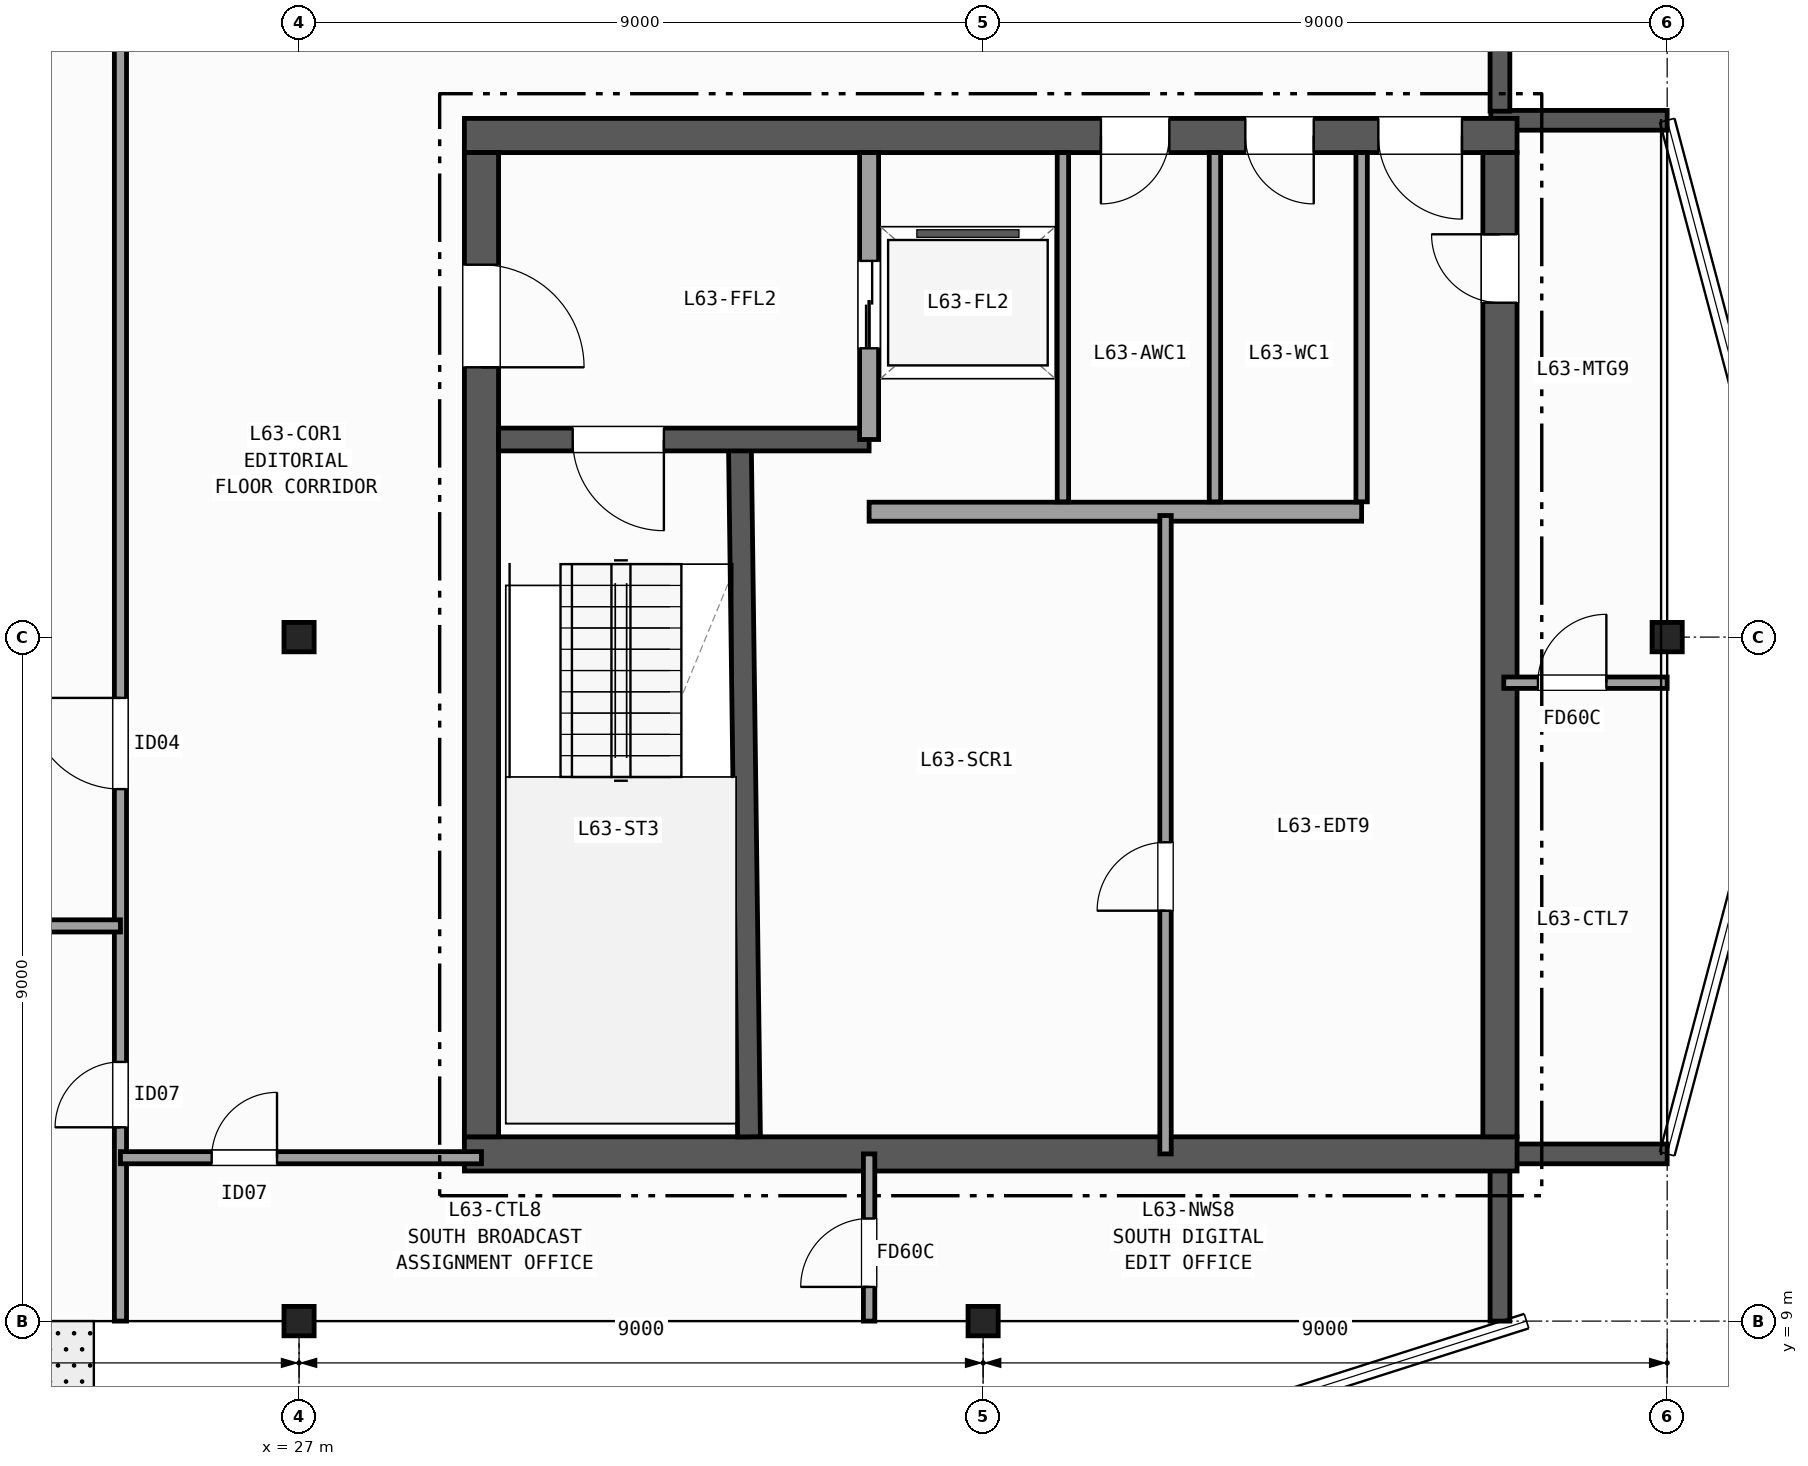
"""IFC4 building model, lengths in metres.
Left out: names, types, materials, properties, quantities, classifications, styles, units other than length and angle.
Written with IfcOpenShell. Run it as: python <this file> out.ifc"""

import sys

from ifc_helpers import new_model, si_unit, direction, frame, frame_2d, origin, origin_2d, place, context, subcontext, project, spatial, rectangle, i_section, extrude, element, fill, save


model = new_model("IFC4")
c1 = context("Model", 3, precision=1e-05, world=origin(), true_north=direction((0.0, 1.0)))
c2 = subcontext(c1, "Body", "Model", "MODEL_VIEW")
j1 = project(units=[si_unit("LENGTHUNIT", "METRE"), si_unit("PLANEANGLEUNIT", "RADIAN")], contexts=[c1])
p1 = place(None, origin())
s1 = spatial("IfcSite", under=j1, at=p1, CompositionType="ELEMENT")
p2 = place(p1, origin())
s2 = spatial("IfcBuilding", under=s1, at=p2, CompositionType="ELEMENT")
p3 = place(p2, frame((0.0, 0.0, 251.9)))
s3 = spatial("IfcBuildingStorey", under=s2, at=p3, CompositionType="ELEMENT", Elevation=251.9)
for number, where, z_axis, x_axis in (
    (1, (27.0, 9.0, 0.0), (0.0, 0.0, 1.0), (1.0, 0.0, 0.0)),
    (2, (27.0, 18.0, 0.0), (0.0, 0.0, 1.0), (1.0, 0.0, 0.0)),
    (3, (36.0, 9.0, 0.0), (0.0, 0.0, 1.0), (1.0, 0.0, 0.0)),
    (4, (45.0, 18.0, 0.0), (0.0, 0.0, 1.0), (1.0, 0.0, 0.0)),
):
    element("IfcColumn", number, at=place(p3, frame(where, z_axis=z_axis, x_axis=x_axis)), inside=s3, PredefinedType="COLUMN", context=c2, shape_type="SweptSolid", body=[
        extrude(i_section(OverallWidth=0.397, OverallDepth=0.387, WebThickness=0.021, FlangeThickness=0.033, FilletRadius=0.015, at=origin_2d()), origin(), (0.0, 0.0, 1.0), 3.7),
    ])
p4 = place(p3, frame((42.8, 9.0, 0.0), z_axis=(0.0, 0.0, 1.0), x_axis=(0.0, 1.0, 0.0)))
e5 = element("IfcWall", 5, at=p4, inside=s3, PredefinedType="SOLIDWALL", context=c2, shape_type="SweptSolid", body=[
    extrude(rectangle(XDim=2.08, YDim=0.26, at=frame_2d((1.04, 0.0))), origin(), (0.0, 0.0, 1.0), 3.42),
])
for number, where, z_axis, x_axis in (
    (6, (42.68, 11.2, 0.0), (0.0, 0.0, 1.0), (1.0, 0.0, 0.0)),
    (7, (45.0, 24.8, 0.0), (0.0, 0.0, 1.0), (-1.0, 0.0, 0.0)),
):
    element("IfcWall", number, at=place(p3, frame(where, z_axis=z_axis, x_axis=x_axis)), inside=s3, PredefinedType="SOLIDWALL", context=c2, shape_type="SweptSolid", body=[
        extrude(rectangle(XDim=2.32, YDim=0.26, at=frame_2d((1.16, 0.0))), origin(), (0.0, 0.0, 1.0), 3.42),
    ])
p5 = place(p3, frame((42.8, 24.92, 0.0), z_axis=(0.0, 0.0, 1.0), x_axis=(0.0, 1.0, 0.0)))
e8 = element("IfcWall", 8, at=p5, inside=s3, PredefinedType="SOLIDWALL", context=c2, shape_type="SweptSolid", body=[
    extrude(rectangle(XDim=2.08, YDim=0.26, at=frame_2d((1.04, 0.0))), origin(), (0.0, 0.0, 1.0), 3.42),
])
p6 = place(p3, frame((29.175, 11.2, 0.0), z_axis=(0.0, 0.0, 1.0), x_axis=(1.0, 0.0, 0.0)))
e9 = element("IfcWall", 9, at=p6, inside=s3, PredefinedType="SHEAR", context=c2, shape_type="SweptSolid", body=[
    extrude(rectangle(XDim=13.85, YDim=0.45, at=frame_2d((6.925, 0.0))), origin(), (0.0, 0.0, 1.0), 3.42),
])
p7 = place(p3, frame((43.025, 24.6, 0.0), z_axis=(0.0, 0.0, 1.0), x_axis=(-1.0, 0.0, 0.0)))
e10 = element("IfcWall", 10, at=p7, inside=s3, PredefinedType="SHEAR", context=c2, shape_type="SweptSolid", body=[
    extrude(rectangle(XDim=13.85, YDim=0.45, at=frame_2d((6.925, 0.0))), origin(), (0.0, 0.0, 1.0), 3.42),
])
p8 = place(p7, frame((0.725, 0.0, 0.0)))
e11 = element("IfcOpeningElement", 11, at=p8, cuts=e10, PredefinedType="OPENING", context=c2, shape_type="SweptSolid", body=[
    extrude(rectangle(XDim=1.1, YDim=2.15, at=frame_2d((0.55, 1.075))), frame((0.0, 0.235, 0.0), z_axis=(0.0, -1.0, 0.0), x_axis=(1.0, 0.0, 0.0)), (0.0, 0.0, 1.0), 0.47),
])
p9 = place(p7, frame((2.675, 0.0, 0.0)))
e12 = element("IfcOpeningElement", 12, at=p9, cuts=e10, PredefinedType="OPENING", context=c2, shape_type="SweptSolid", body=[
    extrude(rectangle(XDim=0.9, YDim=2.1, at=frame_2d((0.45, 1.05))), frame((0.0, 0.235, 0.0), z_axis=(0.0, -1.0, 0.0), x_axis=(1.0, 0.0, 0.0)), (0.0, 0.0, 1.0), 0.47),
])
p10 = place(p7, frame((4.575, 0.0, 0.0)))
e13 = element("IfcOpeningElement", 13, at=p10, cuts=e10, PredefinedType="OPENING", context=c2, shape_type="SweptSolid", body=[
    extrude(rectangle(XDim=0.9, YDim=2.1, at=frame_2d((0.45, 1.05))), frame((0.0, 0.235, 0.0), z_axis=(0.0, -1.0, 0.0), x_axis=(1.0, 0.0, 0.0)), (0.0, 0.0, 1.0), 0.47),
])
p11 = place(p3, frame((29.4, 24.375, 0.0), z_axis=(0.0, 0.0, 1.0), x_axis=(0.0, -1.0, 0.0)))
e14 = element("IfcWall", 14, at=p11, inside=s3, PredefinedType="SHEAR", context=c2, shape_type="SweptSolid", body=[
    extrude(rectangle(XDim=12.95, YDim=0.45, at=frame_2d((6.475, 0.0))), origin(), (0.0, 0.0, 1.0), 3.42),
])
p12 = place(p11, frame((1.475, 0.0, 0.0)))
e15 = element("IfcOpeningElement", 15, at=p12, cuts=e14, PredefinedType="OPENING", context=c2, shape_type="SweptSolid", body=[
    extrude(rectangle(XDim=1.35, YDim=2.15, at=frame_2d((0.675, 1.075))), frame((0.0, 0.235, 0.0), z_axis=(0.0, -1.0, 0.0), x_axis=(1.0, 0.0, 0.0)), (0.0, 0.0, 1.0), 0.47),
])
p13 = place(p3, frame((42.8, 11.425, 0.0), z_axis=(0.0, 0.0, 1.0), x_axis=(0.0, 1.0, 0.0)))
e16 = element("IfcWall", 16, at=p13, inside=s3, PredefinedType="SHEAR", context=c2, shape_type="SweptSolid", body=[
    extrude(rectangle(XDim=12.95, YDim=0.45, at=frame_2d((6.475, 0.0))), origin(), (0.0, 0.0, 1.0), 3.42),
])
p14 = place(p13, frame((10.975, 0.0, 0.0)))
e17 = element("IfcOpeningElement", 17, at=p14, cuts=e16, PredefinedType="OPENING", context=c2, shape_type="SweptSolid", body=[
    extrude(rectangle(XDim=0.9, YDim=2.1, at=frame_2d((0.45, 1.05))), frame((0.0, 0.235, 0.0), z_axis=(0.0, -1.0, 0.0), x_axis=(1.0, 0.0, 0.0)), (0.0, 0.0, 1.0), 0.47),
])
p15 = place(p3, frame((32.92, 11.425, 0.0), z_axis=(0.0, 0.0, 1.0), x_axis=(-0.013135638869, 0.999913723774, 0.0)))
e18 = element("IfcWall", 18, at=p15, inside=s3, PredefinedType="SHEAR", context=c2, shape_type="SweptSolid", body=[
    extrude(rectangle(XDim=9.126, YDim=0.3, at=frame_2d((4.563, 0.0))), origin(), (0.0, 0.0, 1.0), 3.42),
])
p16 = place(p3, frame((34.5, 20.6, 0.0), z_axis=(0.0, 0.0, 1.0), x_axis=(-1.0, 0.0, 0.0)))
e19 = element("IfcWall", 19, at=p16, inside=s3, PredefinedType="SHEAR", context=c2, shape_type="SweptSolid", body=[
    extrude(rectangle(XDim=4.875, YDim=0.3, at=frame_2d((2.438, 0.0))), origin(), (0.0, 0.0, 1.0), 3.42),
])
p17 = place(p16, frame((2.7, 0.0, 0.0)))
e20 = element("IfcOpeningElement", 20, at=p17, cuts=e19, PredefinedType="OPENING", context=c2, shape_type="SweptSolid", body=[
    extrude(rectangle(XDim=1.2, YDim=2.15, at=frame_2d((0.6, 1.075))), frame((0.0, 0.16, 0.0), z_axis=(0.0, -1.0, 0.0), x_axis=(1.0, 0.0, 0.0)), (0.0, 0.0, 1.0), 0.32),
])
p18 = place(p3, frame((34.5, 20.6, 0.0), z_axis=(0.0, 0.0, 1.0), x_axis=(0.0, 1.0, 0.0)))
e21 = element("IfcWall", 21, at=p18, inside=s3, PredefinedType="PARTITIONING", context=c2, shape_type="SweptSolid", body=[
    extrude(rectangle(XDim=3.775, YDim=0.25, at=frame_2d((1.887, 0.0))), origin(), (0.0, 0.0, 1.0), 3.42),
])
p19 = place(p18, frame((1.2, 0.0, 0.0)))
e22 = element("IfcOpeningElement", 22, at=p19, cuts=e21, PredefinedType="OPENING", context=c2, shape_type="SweptSolid", body=[
    extrude(rectangle(XDim=1.15, YDim=2.15, at=frame_2d((0.575, 1.075))), frame((0.0, 0.135, 0.0), z_axis=(0.0, -1.0, 0.0), x_axis=(1.0, 0.0, 0.0)), (0.0, 0.0, 1.0), 0.27),
])
p20 = place(p3, frame((34.5, 19.65, 0.0), z_axis=(0.0, 0.0, 1.0), x_axis=(1.0, 0.0, 0.0)))
e23 = element("IfcWall", 23, at=p20, inside=s3, PredefinedType="PARTITIONING", context=c2, shape_type="SweptSolid", body=[
    extrude(rectangle(XDim=6.48, YDim=0.25, at=frame_2d((3.24, 0.0))), origin(), (0.0, 0.0, 1.0), 3.42),
])
p21 = place(p3, frame((38.4, 11.2, 0.0), z_axis=(0.0, 0.0, 1.0), x_axis=(0.0, 1.0, 0.0)))
e24 = element("IfcWall", 24, at=p21, inside=s3, PredefinedType="PARTITIONING", context=c2, shape_type="SweptSolid", body=[
    extrude(rectangle(XDim=8.4, YDim=0.15, at=frame_2d((4.2, 0.0))), origin(), (0.0, 0.0, 1.0), 3.42),
])
p22 = place(p21, frame((3.2, 0.0, 0.0)))
e25 = element("IfcOpeningElement", 25, at=p22, cuts=e24, PredefinedType="OPENING", context=c2, shape_type="SweptSolid", body=[
    extrude(rectangle(XDim=0.9, YDim=2.1, at=frame_2d((0.45, 1.05))), frame((0.0, 0.085, 0.0), z_axis=(0.0, -1.0, 0.0), x_axis=(1.0, 0.0, 0.0)), (0.0, 0.0, 1.0), 0.17),
])
for number, where, z_axis, x_axis in (
    (26, (37.05, 19.78, 0.0), (0.0, 0.0, 1.0), (0.0, 1.0, 0.0)),
    (27, (39.05, 19.78, 0.0), (0.0, 0.0, 1.0), (0.0, 1.0, 0.0)),
    (28, (40.98, 19.78, 0.0), (0.0, 0.0, 1.0), (0.0, 1.0, 0.0)),
):
    element("IfcWall", number, at=place(p3, frame(where, z_axis=z_axis, x_axis=x_axis)), inside=s3, PredefinedType="PARTITIONING", context=c2, shape_type="SweptSolid", body=[
        extrude(rectangle(XDim=4.595, YDim=0.15, at=frame_2d((2.297, 0.0))), origin(), (0.0, 0.0, 1.0), 3.42),
    ])
p23 = place(p3, frame((24.65, 9.0, 0.0), z_axis=(0.0, 0.0, 1.0), x_axis=(0.0, 1.0, 0.0)))
e29 = element("IfcWall", 29, at=p23, inside=s3, PredefinedType="PARTITIONING", context=c2, shape_type="SweptSolid", body=[
    extrude(rectangle(XDim=19.2, YDim=0.16, at=frame_2d((9.6, 0.0))), origin(), (0.0, 0.0, 1.0), 2.707),
])
p24 = place(p23, frame((7.0, 0.0, 0.0)))
e30 = element("IfcOpeningElement", 30, at=p24, cuts=e29, PredefinedType="OPENING", context=c2, shape_type="SweptSolid", body=[
    extrude(rectangle(XDim=1.2, YDim=2.15, at=frame_2d((0.6, 1.075))), frame((0.0, 0.09, 0.0), z_axis=(0.0, -1.0, 0.0), x_axis=(1.0, 0.0, 0.0)), (0.0, 0.0, 1.0), 0.18),
])
p25 = place(p23, frame((2.55, 0.0, 0.0)))
e31 = element("IfcOpeningElement", 31, at=p25, cuts=e29, PredefinedType="OPENING", context=c2, shape_type="SweptSolid", body=[
    extrude(rectangle(XDim=0.86, YDim=2.05, at=frame_2d((0.43, 1.025))), frame((0.0, 0.09, 0.0), z_axis=(0.0, -1.0, 0.0), x_axis=(1.0, 0.0, 0.0)), (0.0, 0.0, 1.0), 0.18),
])
p26 = place(p3, frame((18.0, 14.2, 0.0), z_axis=(0.0, 0.0, 1.0), x_axis=(1.0, 0.0, 0.0)))
e32 = element("IfcWall", 32, at=p26, inside=s3, PredefinedType="PARTITIONING", context=c2, shape_type="SweptSolid", body=[
    extrude(rectangle(XDim=6.65, YDim=0.16, at=frame_2d((3.325, 0.0))), origin(), (0.0, 0.0, 1.0), 2.789),
])
p27 = place(p3, frame((24.65, 11.15, 0.0), z_axis=(0.0, 0.0, 1.0), x_axis=(1.0, 0.0, 0.0)))
e33 = element("IfcWall", 33, at=p27, inside=s3, PredefinedType="PARTITIONING", context=c2, shape_type="SweptSolid", body=[
    extrude(rectangle(XDim=4.75, YDim=0.16, at=frame_2d((2.375, 0.0))), origin(), (0.0, 0.0, 1.0), 2.792),
])
p28 = place(p27, frame((1.2, 0.0, 0.0)))
e34 = element("IfcOpeningElement", 34, at=p28, cuts=e33, PredefinedType="OPENING", context=c2, shape_type="SweptSolid", body=[
    extrude(rectangle(XDim=0.86, YDim=2.05, at=frame_2d((0.43, 1.025))), frame((0.0, 0.09, 0.0), z_axis=(0.0, -1.0, 0.0), x_axis=(1.0, 0.0, 0.0)), (0.0, 0.0, 1.0), 0.18),
])
p29 = place(p3, frame((34.5, 9.0, 0.0), z_axis=(0.0, 0.0, 1.0), x_axis=(0.0, 1.0, 0.0)))
e35 = element("IfcWall", 35, at=p29, inside=s3, PredefinedType="PARTITIONING", context=c2, shape_type="SweptSolid", body=[
    extrude(rectangle(XDim=2.2, YDim=0.15, at=frame_2d((1.1, 0.0))), origin(), (0.0, 0.0, 1.0), 2.707),
])
p30 = place(p29, frame((0.45, 0.0, 0.0)))
e36 = element("IfcOpeningElement", 36, at=p30, cuts=e35, PredefinedType="OPENING", context=c2, shape_type="SweptSolid", body=[
    extrude(rectangle(XDim=0.9, YDim=2.1, at=frame_2d((0.45, 1.05))), frame((0.0, 0.085, 0.0), z_axis=(0.0, -1.0, 0.0), x_axis=(1.0, 0.0, 0.0)), (0.0, 0.0, 1.0), 0.17),
])
p31 = place(p3, frame((42.85, 17.4, 0.0), z_axis=(0.0, 0.0, 1.0), x_axis=(1.0, 0.0, 0.0)))
e37 = element("IfcWall", 37, at=p31, inside=s3, PredefinedType="PARTITIONING", context=c2, shape_type="SweptSolid", body=[
    extrude(rectangle(XDim=2.15, YDim=0.15, at=frame_2d((1.075, 0.0))), origin(), (0.0, 0.0, 1.0), 3.42),
])
p32 = place(p31, frame((0.45, 0.0, 0.0)))
e38 = element("IfcOpeningElement", 38, at=p32, cuts=e37, PredefinedType="OPENING", context=c2, shape_type="SweptSolid", body=[
    extrude(rectangle(XDim=0.9, YDim=2.1, at=frame_2d((0.45, 1.05))), frame((0.0, 0.085, 0.0), z_axis=(0.0, -1.0, 0.0), x_axis=(1.0, 0.0, 0.0)), (0.0, 0.0, 1.0), 0.17),
])
p33 = place(p17, origin())
e39 = element("IfcDoor", 39, at=p33, inside=s3, OperationType="SINGLE_SWING_LEFT", PredefinedType="DOOR", context=c2, shape_type="SweptSolid", body=[
    extrude(rectangle(XDim=1.2, YDim=2.15, at=frame_2d((0.6, 1.075))), frame((0.0, 0.025, 0.0), z_axis=(0.0, -1.0, 0.0), x_axis=(1.0, 0.0, 0.0)), (0.0, 0.0, 1.0), 0.05),
])
fill(e20, e39)
p34 = place(p12, origin())
e40 = element("IfcDoor", 40, at=p34, inside=s3, OperationType="SINGLE_SWING_RIGHT", PredefinedType="DOOR", context=c2, shape_type="SweptSolid", body=[
    extrude(rectangle(XDim=1.35, YDim=2.15, at=frame_2d((0.675, 1.075))), frame((0.0, 0.025, 0.0), z_axis=(0.0, -1.0, 0.0), x_axis=(1.0, 0.0, 0.0)), (0.0, 0.0, 1.0), 0.05),
])
fill(e15, e40)
p35 = place(p14, origin())
e41 = element("IfcDoor", 41, at=p35, inside=s3, OperationType="SINGLE_SWING_RIGHT", PredefinedType="DOOR", context=c2, shape_type="SweptSolid", body=[
    extrude(rectangle(XDim=0.9, YDim=2.1, at=frame_2d((0.45, 1.05))), frame((0.0, 0.025, 0.0), z_axis=(0.0, -1.0, 0.0), x_axis=(1.0, 0.0, 0.0)), (0.0, 0.0, 1.0), 0.05),
])
fill(e17, e41)
p36 = place(p8, origin())
e42 = element("IfcDoor", 42, at=p36, inside=s3, OperationType="SINGLE_SWING_LEFT", PredefinedType="DOOR", context=c2, shape_type="SweptSolid", body=[
    extrude(rectangle(XDim=1.1, YDim=2.15, at=frame_2d((0.55, 1.075))), frame((0.0, 0.025, 0.0), z_axis=(0.0, -1.0, 0.0), x_axis=(1.0, 0.0, 0.0)), (0.0, 0.0, 1.0), 0.05),
])
fill(e11, e42)
p37 = place(p9, origin())
e43 = element("IfcDoor", 43, at=p37, inside=s3, OperationType="SINGLE_SWING_LEFT", PredefinedType="DOOR", context=c2, shape_type="SweptSolid", body=[
    extrude(rectangle(XDim=0.9, YDim=2.1, at=frame_2d((0.45, 1.05))), frame((0.0, 0.025, 0.0), z_axis=(0.0, -1.0, 0.0), x_axis=(1.0, 0.0, 0.0)), (0.0, 0.0, 1.0), 0.05),
])
fill(e12, e43)
p38 = place(p10, origin())
e44 = element("IfcDoor", 44, at=p38, inside=s3, OperationType="SINGLE_SWING_RIGHT", PredefinedType="DOOR", context=c2, shape_type="SweptSolid", body=[
    extrude(rectangle(XDim=0.9, YDim=2.1, at=frame_2d((0.45, 1.05))), frame((0.0, 0.025, 0.0), z_axis=(0.0, -1.0, 0.0), x_axis=(1.0, 0.0, 0.0)), (0.0, 0.0, 1.0), 0.05),
])
fill(e13, e44)
p39 = place(p19, origin())
e45 = element("IfcDoor", 45, at=p39, inside=s3, OperationType="DOUBLE_DOOR_SLIDING", PredefinedType="DOOR", context=c2, shape_type="SweptSolid", body=[
    extrude(rectangle(XDim=1.15, YDim=2.15, at=frame_2d((0.575, 1.075))), frame((0.0, 0.025, 0.0), z_axis=(0.0, -1.0, 0.0), x_axis=(1.0, 0.0, 0.0)), (0.0, 0.0, 1.0), 0.05),
])
fill(e22, e45)
p40 = place(p22, origin())
e46 = element("IfcDoor", 46, at=p40, inside=s3, OperationType="SINGLE_SWING_LEFT", PredefinedType="DOOR", context=c2, shape_type="SweptSolid", body=[
    extrude(rectangle(XDim=0.9, YDim=2.1, at=frame_2d((0.45, 1.05))), frame((0.0, 0.025, 0.0), z_axis=(0.0, -1.0, 0.0), x_axis=(1.0, 0.0, 0.0)), (0.0, 0.0, 1.0), 0.05),
])
fill(e25, e46)
p41 = place(p24, origin())
e47 = element("IfcDoor", 47, at=p41, inside=s3, OperationType="SINGLE_SWING_RIGHT", PredefinedType="DOOR", context=c2, shape_type="SweptSolid", body=[
    extrude(rectangle(XDim=1.2, YDim=2.15, at=frame_2d((0.6, 1.075))), frame((0.0, 0.025, 0.0), z_axis=(0.0, -1.0, 0.0), x_axis=(1.0, 0.0, 0.0)), (0.0, 0.0, 1.0), 0.05),
])
fill(e30, e47)
p42 = place(p25, origin())
e48 = element("IfcDoor", 48, at=p42, inside=s3, OperationType="SINGLE_SWING_LEFT", PredefinedType="DOOR", context=c2, shape_type="SweptSolid", body=[
    extrude(rectangle(XDim=0.86, YDim=2.05, at=frame_2d((0.43, 1.025))), frame((0.0, 0.025, 0.0), z_axis=(0.0, -1.0, 0.0), x_axis=(1.0, 0.0, 0.0)), (0.0, 0.0, 1.0), 0.05),
])
fill(e31, e48)
p43 = place(p28, origin())
e49 = element("IfcDoor", 49, at=p43, inside=s3, OperationType="SINGLE_SWING_RIGHT", PredefinedType="DOOR", context=c2, shape_type="SweptSolid", body=[
    extrude(rectangle(XDim=0.86, YDim=2.05, at=frame_2d((0.43, 1.025))), frame((0.0, 0.025, 0.0), z_axis=(0.0, -1.0, 0.0), x_axis=(1.0, 0.0, 0.0)), (0.0, 0.0, 1.0), 0.05),
])
fill(e34, e49)
p44 = place(p30, origin())
e50 = element("IfcDoor", 50, at=p44, inside=s3, OperationType="SINGLE_SWING_LEFT", PredefinedType="DOOR", context=c2, shape_type="SweptSolid", body=[
    extrude(rectangle(XDim=0.9, YDim=2.1, at=frame_2d((0.45, 1.05))), frame((0.0, 0.025, 0.0), z_axis=(0.0, -1.0, 0.0), x_axis=(1.0, 0.0, 0.0)), (0.0, 0.0, 1.0), 0.05),
])
fill(e36, e50)
p45 = place(p32, origin())
e51 = element("IfcDoor", 51, at=p45, inside=s3, OperationType="SINGLE_SWING_RIGHT", PredefinedType="DOOR", context=c2, shape_type="SweptSolid", body=[
    extrude(rectangle(XDim=0.9, YDim=2.1, at=frame_2d((0.45, 1.05))), frame((0.0, 0.025, 0.0), z_axis=(0.0, -1.0, 0.0), x_axis=(1.0, 0.0, 0.0)), (0.0, 0.0, 1.0), 0.05),
])
fill(e38, e51)
save(model, sys.argv[1])
